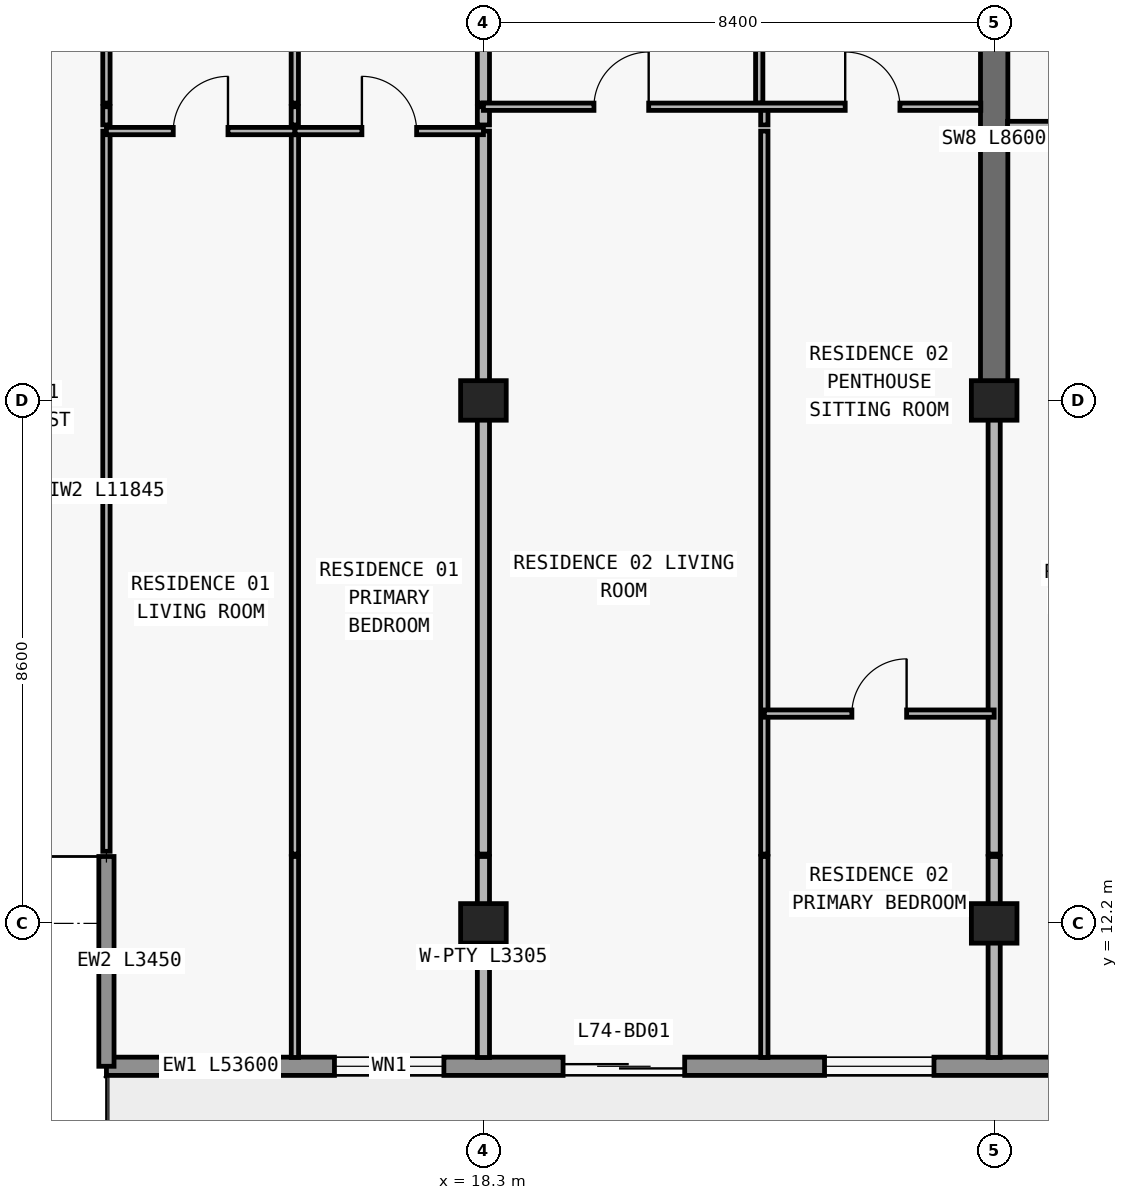
"""IFC4 building model, lengths in metres.
Left out: names, types, materials, properties, quantities, classifications, styles, units other than length and angle.
Written with IfcOpenShell. Run it as: python <this file> out.ifc"""

import sys

from ifc_helpers import new_model, si_unit, direction, frame, frame_2d, origin, origin_2d, place, context, subcontext, project, spatial, rectangle, extrude, element, fill, save


model = new_model("IFC4")
c1 = context("Model", 3, precision=1e-05, world=origin(), true_north=direction((0.0, 1.0)))
c2 = subcontext(c1, "Body", "Model", "MODEL_VIEW")
j1 = project(units=[si_unit("LENGTHUNIT", "METRE"), si_unit("PLANEANGLEUNIT", "RADIAN")], contexts=[c1])
p1 = place(None, origin())
s1 = spatial("IfcSite", under=j1, at=p1, CompositionType="ELEMENT")
p2 = place(p1, origin())
s2 = spatial("IfcBuilding", under=s1, at=p2, CompositionType="ELEMENT")
p3 = place(p2, frame((0.0, 0.0, 262.8)))
s3 = spatial("IfcBuildingStorey", under=s2, at=p3, CompositionType="ELEMENT", Elevation=262.8)
for number, where, z_axis, x_axis in (
    (1, (18.3, 12.2, 0.0), (0.0, 0.0, 1.0), (1.0, 0.0, 0.0)),
    (2, (26.7, 12.2, 0.0), (0.0, 0.0, 1.0), (1.0, 0.0, 0.0)),
    (3, (18.3, 20.8, 0.0), (0.0, 0.0, 1.0), (1.0, 0.0, 0.0)),
    (4, (26.7, 20.8, 0.0), (0.0, 0.0, 1.0), (1.0, 0.0, 0.0)),
):
    element("IfcColumn", number, at=place(p3, frame(where, z_axis=z_axis, x_axis=x_axis)), inside=s3, PredefinedType="COLUMN", context=c2, shape_type="SweptSolid", body=[
        extrude(rectangle(XDim=0.75, YDim=0.65, at=origin_2d()), origin(), (0.0, 0.0, 1.0), 3.05),
    ])
p4 = place(p3, frame((26.7, 20.8, 0.0), z_axis=(0.0, 0.0, 1.0), x_axis=(0.0, 1.0, 0.0)))
e5 = element("IfcWall", 5, at=p4, inside=s3, PredefinedType="SHEAR", context=c2, shape_type="SweptSolid", body=[
    extrude(rectangle(XDim=8.6, YDim=0.45, at=frame_2d((4.3, 0.0))), origin(), (0.0, 0.0, 1.0), 3.05),
])
p5 = place(p3, frame((65.7, 9.85, 0.0), z_axis=(0.0, 0.0, 1.0), x_axis=(-1.0, 0.0, 0.0)))
e6 = element("IfcWall", 6, at=p5, inside=s3, PredefinedType="STANDARD", context=c2, shape_type="SweptSolid", body=[
    extrude(rectangle(XDim=53.6, YDim=0.3, at=frame_2d((26.8, 0.0))), origin(), (0.0, 0.0, 1.0), 3.05),
])
p6 = place(p5, frame((48.05, 0.0, 0.85)))
e7 = element("IfcOpeningElement", 7, at=p6, cuts=e6, PredefinedType="OPENING", context=c2, shape_type="SweptSolid", body=[
    extrude(rectangle(XDim=1.8, YDim=1.55, at=frame_2d((0.9, 0.775))), frame((0.0, 0.16, 0.0), z_axis=(0.0, -1.0, 0.0), x_axis=(1.0, 0.0, 0.0)), (0.0, 0.0, 1.0), 0.32),
])
p7 = place(p5, frame((44.09, 0.0, 0.0)))
e8 = element("IfcOpeningElement", 8, at=p7, cuts=e6, PredefinedType="OPENING", context=c2, shape_type="SweptSolid", body=[
    extrude(rectangle(XDim=2.0, YDim=2.3, at=frame_2d((1.0, 1.15))), frame((0.0, 0.16, 0.0), z_axis=(0.0, -1.0, 0.0), x_axis=(1.0, 0.0, 0.0)), (0.0, 0.0, 1.0), 0.32),
])
p8 = place(p5, frame((39.99, 0.0, 0.85)))
e9 = element("IfcOpeningElement", 9, at=p8, cuts=e6, PredefinedType="OPENING", context=c2, shape_type="SweptSolid", body=[
    extrude(rectangle(XDim=1.8, YDim=1.55, at=frame_2d((0.9, 0.775))), frame((0.0, 0.16, 0.0), z_axis=(0.0, -1.0, 0.0), x_axis=(1.0, 0.0, 0.0)), (0.0, 0.0, 1.0), 0.32),
])
p9 = place(p5, frame((36.026, 0.0, 0.0)))
e10 = element("IfcOpeningElement", 10, at=p9, cuts=e6, PredefinedType="OPENING", context=c2, shape_type="SweptSolid", body=[
    extrude(rectangle(XDim=2.0, YDim=2.3, at=frame_2d((1.0, 1.15))), frame((0.0, 0.16, 0.0), z_axis=(0.0, -1.0, 0.0), x_axis=(1.0, 0.0, 0.0)), (0.0, 0.0, 1.0), 0.32),
])
p10 = place(p5, frame((31.726, 0.0, 0.85)))
e11 = element("IfcOpeningElement", 11, at=p10, cuts=e6, PredefinedType="OPENING", context=c2, shape_type="SweptSolid", body=[
    extrude(rectangle(XDim=2.2, YDim=1.55, at=frame_2d((1.1, 0.775))), frame((0.0, 0.16, 0.0), z_axis=(0.0, -1.0, 0.0), x_axis=(1.0, 0.0, 0.0)), (0.0, 0.0, 1.0), 0.32),
])
p11 = place(p5, frame((27.51, 0.0, 0.0)))
e12 = element("IfcOpeningElement", 12, at=p11, cuts=e6, PredefinedType="OPENING", context=c2, shape_type="SweptSolid", body=[
    extrude(rectangle(XDim=2.0, YDim=2.3, at=frame_2d((1.0, 1.15))), frame((0.0, 0.16, 0.0), z_axis=(0.0, -1.0, 0.0), x_axis=(1.0, 0.0, 0.0)), (0.0, 0.0, 1.0), 0.32),
])
p12 = place(p5, frame((23.81, 0.0, 0.85)))
e13 = element("IfcOpeningElement", 13, at=p12, cuts=e6, PredefinedType="OPENING", context=c2, shape_type="SweptSolid", body=[
    extrude(rectangle(XDim=1.8, YDim=1.55, at=frame_2d((0.9, 0.775))), frame((0.0, 0.16, 0.0), z_axis=(0.0, -1.0, 0.0), x_axis=(1.0, 0.0, 0.0)), (0.0, 0.0, 1.0), 0.32),
])
p13 = place(p5, frame((20.026, 0.0, 0.0)))
e14 = element("IfcOpeningElement", 14, at=p13, cuts=e6, PredefinedType="OPENING", context=c2, shape_type="SweptSolid", body=[
    extrude(rectangle(XDim=2.0, YDim=2.3, at=frame_2d((1.0, 1.15))), frame((0.0, 0.16, 0.0), z_axis=(0.0, -1.0, 0.0), x_axis=(1.0, 0.0, 0.0)), (0.0, 0.0, 1.0), 0.32),
])
p14 = place(p5, frame((15.726, 0.0, 0.85)))
e15 = element("IfcOpeningElement", 15, at=p14, cuts=e6, PredefinedType="OPENING", context=c2, shape_type="SweptSolid", body=[
    extrude(rectangle(XDim=2.2, YDim=1.55, at=frame_2d((1.1, 0.775))), frame((0.0, 0.16, 0.0), z_axis=(0.0, -1.0, 0.0), x_axis=(1.0, 0.0, 0.0)), (0.0, 0.0, 1.0), 0.32),
])
p15 = place(p5, frame((11.69, 0.0, 0.0)))
e16 = element("IfcOpeningElement", 16, at=p15, cuts=e6, PredefinedType="OPENING", context=c2, shape_type="SweptSolid", body=[
    extrude(rectangle(XDim=2.0, YDim=2.3, at=frame_2d((1.0, 1.15))), frame((0.0, 0.16, 0.0), z_axis=(0.0, -1.0, 0.0), x_axis=(1.0, 0.0, 0.0)), (0.0, 0.0, 1.0), 0.32),
])
p16 = place(p5, frame((7.01, 0.0, 0.65)))
e17 = element("IfcOpeningElement", 17, at=p16, cuts=e6, PredefinedType="OPENING", context=c2, shape_type="SweptSolid", body=[
    extrude(rectangle(XDim=2.6, YDim=1.85, at=frame_2d((1.3, 0.925))), frame((0.0, 0.16, 0.0), z_axis=(0.0, -1.0, 0.0), x_axis=(1.0, 0.0, 0.0)), (0.0, 0.0, 1.0), 0.32),
])
p17 = place(p5, frame((2.0, 0.0, 0.85)))
e18 = element("IfcOpeningElement", 18, at=p17, cuts=e6, PredefinedType="OPENING", context=c2, shape_type="SweptSolid", body=[
    extrude(rectangle(XDim=2.2, YDim=1.55, at=frame_2d((1.1, 0.775))), frame((0.0, 0.16, 0.0), z_axis=(0.0, -1.0, 0.0), x_axis=(1.0, 0.0, 0.0)), (0.0, 0.0, 1.0), 0.32),
])
p18 = place(p3, frame((12.1, 13.3, 0.0), z_axis=(0.0, 0.0, 1.0), x_axis=(0.0, -1.0, 0.0)))
e19 = element("IfcWall", 19, at=p18, inside=s3, PredefinedType="ELEMENTEDWALL", context=c2, shape_type="SweptSolid", body=[
    extrude(rectangle(XDim=3.45, YDim=0.25, at=frame_2d((1.725, 0.0))), origin(), (0.0, 0.0, 1.0), 3.05),
])
p19 = place(p3, frame((12.1, 13.385, 0.0), z_axis=(0.0, 0.0, 1.0), x_axis=(0.0, 1.0, 0.0)))
e20 = element("IfcWall", 20, at=p19, inside=s3, PredefinedType="PARTITIONING", context=c2, shape_type="SweptSolid", body=[
    extrude(rectangle(XDim=11.845, YDim=0.12, at=frame_2d((5.922, 0.0))), origin(), (0.0, 0.0, 1.0), 2.578),
])
p20 = place(p3, frame((12.1, 25.33, 0.0), z_axis=(0.0, 0.0, 1.0), x_axis=(0.0, 1.0, 0.0)))
e21 = element("IfcWall", 21, at=p20, inside=s3, PredefinedType="PARTITIONING", context=c2, shape_type="SweptSolid", body=[
    extrude(rectangle(XDim=0.3, YDim=0.12, at=frame_2d((0.15, 0.0))), origin(), (0.0, 0.0, 1.0), 2.578),
])
p21 = place(p3, frame((12.1, 25.69, 0.0), z_axis=(0.0, 0.0, 1.0), x_axis=(0.0, 1.0, 0.0)))
e22 = element("IfcWall", 22, at=p21, inside=s3, PredefinedType="PARTITIONING", context=c2, shape_type="SweptSolid", body=[
    extrude(rectangle(XDim=4.69, YDim=0.12, at=frame_2d((2.345, 0.0))), origin(), (0.0, 0.0, 1.0), 2.578),
])
p22 = place(p21, frame((1.895, 0.0, 0.0)))
e23 = element("IfcOpeningElement", 23, at=p22, cuts=e22, PredefinedType="OPENING", context=c2, shape_type="SweptSolid", body=[
    extrude(rectangle(XDim=0.9, YDim=2.15, at=frame_2d((0.45, 1.075))), frame((0.0, 0.07, 0.0), z_axis=(0.0, -1.0, 0.0), x_axis=(1.0, 0.0, 0.0)), (0.0, 0.0, 1.0), 0.14),
])
p23 = place(p3, frame((15.198, 25.33, 0.0), z_axis=(0.0, 0.0, 1.0), x_axis=(0.0, 1.0, 0.0)))
e24 = element("IfcWall", 24, at=p23, inside=s3, PredefinedType="PARTITIONING", context=c2, shape_type="SweptSolid", body=[
    extrude(rectangle(XDim=0.3, YDim=0.12, at=frame_2d((0.15, 0.0))), origin(), (0.0, 0.0, 1.0), 3.05),
])
p24 = place(p3, frame((15.198, 25.69, 0.0), z_axis=(0.0, 0.0, 1.0), x_axis=(0.0, 1.0, 0.0)))
e25 = element("IfcWall", 25, at=p24, inside=s3, PredefinedType="PARTITIONING", context=c2, shape_type="SweptSolid", body=[
    extrude(rectangle(XDim=4.69, YDim=0.12, at=frame_2d((2.345, 0.0))), origin(), (0.0, 0.0, 1.0), 3.05),
])
p25 = place(p24, frame((1.895, 0.0, 0.0)))
e26 = element("IfcOpeningElement", 26, at=p25, cuts=e25, PredefinedType="OPENING", context=c2, shape_type="SweptSolid", body=[
    extrude(rectangle(XDim=0.9, YDim=2.15, at=frame_2d((0.45, 1.075))), frame((0.0, 0.07, 0.0), z_axis=(0.0, -1.0, 0.0), x_axis=(1.0, 0.0, 0.0)), (0.0, 0.0, 1.0), 0.14),
])
p26 = place(p3, frame((15.2, 9.995, 0.0), z_axis=(0.0, 0.0, 1.0), x_axis=(0.0, 1.0, 0.0)))
e27 = element("IfcWall", 27, at=p26, inside=s3, PredefinedType="PARTITIONING", context=c2, shape_type="SweptSolid", body=[
    extrude(rectangle(XDim=3.305, YDim=0.12, at=frame_2d((1.652, 0.0))), origin(), (0.0, 0.0, 1.0), 3.05),
])
p27 = place(p3, frame((15.2, 13.34, 0.0), z_axis=(0.0, 0.0, 1.0), x_axis=(0.0, 1.0, 0.0)))
e28 = element("IfcWall", 28, at=p27, inside=s3, PredefinedType="PARTITIONING", context=c2, shape_type="SweptSolid", body=[
    extrude(rectangle(XDim=11.89, YDim=0.12, at=frame_2d((5.945, 0.0))), origin(), (0.0, 0.0, 1.0), 3.05),
])
p28 = place(p3, frame((18.3, 9.995, 0.0), z_axis=(0.0, 0.0, 1.0), x_axis=(0.0, 1.0, 0.0)))
e29 = element("IfcWall", 29, at=p28, inside=s3, PredefinedType="PARTITIONING", context=c2, shape_type="SweptSolid", body=[
    extrude(rectangle(XDim=3.305, YDim=0.2, at=frame_2d((1.652, 0.0))), origin(), (0.0, 0.0, 1.0), 2.263),
])
p29 = place(p3, frame((18.3, 13.34, 0.0), z_axis=(0.0, 0.0, 1.0), x_axis=(0.0, 1.0, 0.0)))
e30 = element("IfcWall", 30, at=p29, inside=s3, PredefinedType="PARTITIONING", context=c2, shape_type="SweptSolid", body=[
    extrude(rectangle(XDim=11.89, YDim=0.2, at=frame_2d((5.945, 0.0))), origin(), (0.0, 0.0, 1.0), 2.263),
])
p30 = place(p3, frame((18.3, 25.33, 0.0), z_axis=(0.0, 0.0, 1.0), x_axis=(0.0, 1.0, 0.0)))
e31 = element("IfcWall", 31, at=p30, inside=s3, PredefinedType="PARTITIONING", context=c2, shape_type="SweptSolid", body=[
    extrude(rectangle(XDim=0.3, YDim=0.2, at=frame_2d((0.15, 0.0))), origin(), (0.0, 0.0, 1.0), 2.263),
])
p31 = place(p3, frame((18.3, 25.69, 0.0), z_axis=(0.0, 0.0, 1.0), x_axis=(0.0, 1.0, 0.0)))
e32 = element("IfcWall", 32, at=p31, inside=s3, PredefinedType="PARTITIONING", context=c2, shape_type="SweptSolid", body=[
    extrude(rectangle(XDim=4.69, YDim=0.2, at=frame_2d((2.345, 0.0))), origin(), (0.0, 0.0, 1.0), 2.263),
])
p32 = place(p3, frame((22.836, 25.69, 0.0), z_axis=(0.0, 0.0, 1.0), x_axis=(0.0, 1.0, 0.0)))
e33 = element("IfcWall", 33, at=p32, inside=s3, PredefinedType="PARTITIONING", context=c2, shape_type="SweptSolid", body=[
    extrude(rectangle(XDim=4.69, YDim=0.12, at=frame_2d((2.345, 0.0))), origin(), (0.0, 0.0, 1.0), 3.05),
])
p33 = place(p32, frame((1.895, 0.0, 0.0)))
e34 = element("IfcOpeningElement", 34, at=p33, cuts=e33, PredefinedType="OPENING", context=c2, shape_type="SweptSolid", body=[
    extrude(rectangle(XDim=0.9, YDim=2.15, at=frame_2d((0.45, 1.075))), frame((0.0, 0.07, 0.0), z_axis=(0.0, -1.0, 0.0), x_axis=(1.0, 0.0, 0.0)), (0.0, 0.0, 1.0), 0.14),
])
p34 = place(p3, frame((22.92, 9.995, 0.0), z_axis=(0.0, 0.0, 1.0), x_axis=(0.0, 1.0, 0.0)))
e35 = element("IfcWall", 35, at=p34, inside=s3, PredefinedType="PARTITIONING", context=c2, shape_type="SweptSolid", body=[
    extrude(rectangle(XDim=3.305, YDim=0.12, at=frame_2d((1.652, 0.0))), origin(), (0.0, 0.0, 1.0), 3.05),
])
p35 = place(p3, frame((22.92, 13.34, 0.0), z_axis=(0.0, 0.0, 1.0), x_axis=(0.0, 1.0, 0.0)))
e36 = element("IfcWall", 36, at=p35, inside=s3, PredefinedType="PARTITIONING", context=c2, shape_type="SweptSolid", body=[
    extrude(rectangle(XDim=11.89, YDim=0.12, at=frame_2d((5.945, 0.0))), origin(), (0.0, 0.0, 1.0), 3.05),
])
p36 = place(p3, frame((22.92, 25.33, 0.0), z_axis=(0.0, 0.0, 1.0), x_axis=(0.0, 1.0, 0.0)))
e37 = element("IfcWall", 37, at=p36, inside=s3, PredefinedType="PARTITIONING", context=c2, shape_type="SweptSolid", body=[
    extrude(rectangle(XDim=0.3, YDim=0.12, at=frame_2d((0.15, 0.0))), origin(), (0.0, 0.0, 1.0), 3.05),
])
p37 = place(p3, frame((26.7, 9.995, 0.0), z_axis=(0.0, 0.0, 1.0), x_axis=(0.0, 1.0, 0.0)))
e38 = element("IfcWall", 38, at=p37, inside=s3, PredefinedType="PARTITIONING", context=c2, shape_type="SweptSolid", body=[
    extrude(rectangle(XDim=3.305, YDim=0.2, at=frame_2d((1.652, 0.0))), origin(), (0.0, 0.0, 1.0), 2.263),
])
p38 = place(p3, frame((26.7, 13.34, 0.0), z_axis=(0.0, 0.0, 1.0), x_axis=(0.0, 1.0, 0.0)))
e39 = element("IfcWall", 39, at=p38, inside=s3, PredefinedType="PARTITIONING", context=c2, shape_type="SweptSolid", body=[
    extrude(rectangle(XDim=7.455, YDim=0.2, at=frame_2d((3.728, 0.0))), origin(), (0.0, 0.0, 1.0), 2.263),
])
p39 = place(p3, frame((22.92, 15.65, 0.0), z_axis=(0.0, 0.0, 1.0), x_axis=(1.0, 0.0, 0.0)))
e40 = element("IfcWall", 40, at=p39, inside=s3, PredefinedType="PARTITIONING", context=c2, shape_type="SweptSolid", body=[
    extrude(rectangle(XDim=3.78, YDim=0.12, at=frame_2d((1.89, 0.0))), origin(), (0.0, 0.0, 1.0), 3.05),
])
p40 = place(p39, frame((1.44, 0.0, 0.0)))
e41 = element("IfcOpeningElement", 41, at=p40, cuts=e40, PredefinedType="OPENING", context=c2, shape_type="SweptSolid", body=[
    extrude(rectangle(XDim=0.9, YDim=2.15, at=frame_2d((0.45, 1.075))), frame((0.0, 0.07, 0.0), z_axis=(0.0, -1.0, 0.0), x_axis=(1.0, 0.0, 0.0)), (0.0, 0.0, 1.0), 0.14),
])
p41 = place(p3, frame((12.1, 25.23, 0.0), z_axis=(0.0, 0.0, 1.0), x_axis=(1.0, 0.0, 0.0)))
e42 = element("IfcWall", 42, at=p41, inside=s3, PredefinedType="PARTITIONING", context=c2, shape_type="SweptSolid", body=[
    extrude(rectangle(XDim=3.098, YDim=0.12, at=frame_2d((1.549, 0.0))), origin(), (0.0, 0.0, 1.0), 3.05),
])
p42 = place(p41, frame((1.099, 0.0, 0.0)))
e43 = element("IfcOpeningElement", 43, at=p42, cuts=e42, PredefinedType="OPENING", context=c2, shape_type="SweptSolid", body=[
    extrude(rectangle(XDim=0.9, YDim=2.15, at=frame_2d((0.45, 1.075))), frame((0.0, 0.07, 0.0), z_axis=(0.0, -1.0, 0.0), x_axis=(1.0, 0.0, 0.0)), (0.0, 0.0, 1.0), 0.14),
])
p43 = place(p3, frame((15.203, 25.23, 0.0), z_axis=(0.0, 0.0, 1.0), x_axis=(1.0, 0.0, 0.0)))
e44 = element("IfcWall", 44, at=p43, inside=s3, PredefinedType="PARTITIONING", context=c2, shape_type="SweptSolid", body=[
    extrude(rectangle(XDim=3.097, YDim=0.12, at=frame_2d((1.549, 0.0))), origin(), (0.0, 0.0, 1.0), 3.05),
])
p44 = place(p43, frame((1.098, 0.0, 0.0)))
e45 = element("IfcOpeningElement", 45, at=p44, cuts=e44, PredefinedType="OPENING", context=c2, shape_type="SweptSolid", body=[
    extrude(rectangle(XDim=0.9, YDim=2.15, at=frame_2d((0.45, 1.075))), frame((0.0, 0.07, 0.0), z_axis=(0.0, -1.0, 0.0), x_axis=(1.0, 0.0, 0.0)), (0.0, 0.0, 1.0), 0.14),
])
p45 = place(p3, frame((26.92, 25.33, 0.0), z_axis=(0.0, 0.0, 1.0), x_axis=(1.0, 0.0, 0.0)))
e46 = element("IfcWall", 46, at=p45, inside=s3, PredefinedType="PARTITIONING", context=c2, shape_type="SweptSolid", body=[
    extrude(rectangle(XDim=4.566, YDim=0.12, at=frame_2d((2.283, 0.0))), origin(), (0.0, 0.0, 1.0), 3.05),
])
p46 = place(p45, frame((1.414, 0.0, 0.0)))
e47 = element("IfcOpeningElement", 47, at=p46, cuts=e46, PredefinedType="OPENING", context=c2, shape_type="SweptSolid", body=[
    extrude(rectangle(XDim=0.9, YDim=2.15, at=frame_2d((0.45, 1.075))), frame((0.0, 0.07, 0.0), z_axis=(0.0, -1.0, 0.0), x_axis=(1.0, 0.0, 0.0)), (0.0, 0.0, 1.0), 0.14),
])
p47 = place(p3, frame((18.3, 25.63, 0.0), z_axis=(0.0, 0.0, 1.0), x_axis=(1.0, 0.0, 0.0)))
e48 = element("IfcWall", 48, at=p47, inside=s3, PredefinedType="PARTITIONING", context=c2, shape_type="SweptSolid", body=[
    extrude(rectangle(XDim=8.18, YDim=0.12, at=frame_2d((4.09, 0.0))), origin(), (0.0, 0.0, 1.0), 3.05),
])
p48 = place(p47, frame((1.818, 0.0, 0.0)))
e49 = element("IfcOpeningElement", 49, at=p48, cuts=e48, PredefinedType="OPENING", context=c2, shape_type="SweptSolid", body=[
    extrude(rectangle(XDim=0.9, YDim=2.15, at=frame_2d((0.45, 1.075))), frame((0.0, 0.07, 0.0), z_axis=(0.0, -1.0, 0.0), x_axis=(1.0, 0.0, 0.0)), (0.0, 0.0, 1.0), 0.14),
])
p49 = place(p47, frame((5.95, 0.0, 0.0)))
e50 = element("IfcOpeningElement", 50, at=p49, cuts=e48, PredefinedType="OPENING", context=c2, shape_type="SweptSolid", body=[
    extrude(rectangle(XDim=0.9, YDim=2.15, at=frame_2d((0.45, 1.075))), frame((0.0, 0.07, 0.0), z_axis=(0.0, -1.0, 0.0), x_axis=(1.0, 0.0, 0.0)), (0.0, 0.0, 1.0), 0.14),
])
p50 = place(p6, origin())
e51 = element("IfcWindow", 51, at=p50, inside=s3, PartitioningType="SINGLE_PANEL", PredefinedType="WINDOW", context=c2, shape_type="SweptSolid", body=[
    extrude(rectangle(XDim=1.8, YDim=1.55, at=frame_2d((0.9, 0.775))), frame((0.0, 0.03, 0.0), z_axis=(0.0, -1.0, 0.0), x_axis=(1.0, 0.0, 0.0)), (0.0, 0.0, 1.0), 0.06),
])
fill(e7, e51)
p51 = place(p7, origin())
e52 = element("IfcDoor", 52, at=p51, inside=s3, OperationType="DOUBLE_DOOR_SLIDING", PredefinedType="DOOR", context=c2, shape_type="SweptSolid", body=[
    extrude(rectangle(XDim=2.0, YDim=2.3, at=frame_2d((1.0, 1.15))), frame((0.0, 0.025, 0.0), z_axis=(0.0, -1.0, 0.0), x_axis=(1.0, 0.0, 0.0)), (0.0, 0.0, 1.0), 0.05),
])
fill(e8, e52)
p52 = place(p8, origin())
e53 = element("IfcWindow", 53, at=p52, inside=s3, PartitioningType="SINGLE_PANEL", PredefinedType="WINDOW", context=c2, shape_type="SweptSolid", body=[
    extrude(rectangle(XDim=1.8, YDim=1.55, at=frame_2d((0.9, 0.775))), frame((0.0, 0.03, 0.0), z_axis=(0.0, -1.0, 0.0), x_axis=(1.0, 0.0, 0.0)), (0.0, 0.0, 1.0), 0.06),
])
fill(e9, e53)
p53 = place(p42, origin())
e54 = element("IfcDoor", 54, at=p53, inside=s3, OperationType="SINGLE_SWING_RIGHT", PredefinedType="DOOR", context=c2, shape_type="SweptSolid", body=[
    extrude(rectangle(XDim=0.9, YDim=2.15, at=frame_2d((0.45, 1.075))), frame((0.0, 0.025, 0.0), z_axis=(0.0, -1.0, 0.0), x_axis=(1.0, 0.0, 0.0)), (0.0, 0.0, 1.0), 0.05),
])
fill(e43, e54)
p54 = place(p44, origin())
e55 = element("IfcDoor", 55, at=p54, inside=s3, OperationType="SINGLE_SWING_LEFT", PredefinedType="DOOR", context=c2, shape_type="SweptSolid", body=[
    extrude(rectangle(XDim=0.9, YDim=2.15, at=frame_2d((0.45, 1.075))), frame((0.0, 0.025, 0.0), z_axis=(0.0, -1.0, 0.0), x_axis=(1.0, 0.0, 0.0)), (0.0, 0.0, 1.0), 0.05),
])
fill(e45, e55)
p55 = place(p48, origin())
e56 = element("IfcDoor", 56, at=p55, inside=s3, OperationType="SINGLE_SWING_RIGHT", PredefinedType="DOOR", context=c2, shape_type="SweptSolid", body=[
    extrude(rectangle(XDim=0.9, YDim=2.15, at=frame_2d((0.45, 1.075))), frame((0.0, 0.025, 0.0), z_axis=(0.0, -1.0, 0.0), x_axis=(1.0, 0.0, 0.0)), (0.0, 0.0, 1.0), 0.05),
])
fill(e49, e56)
p56 = place(p49, origin())
e57 = element("IfcDoor", 57, at=p56, inside=s3, OperationType="SINGLE_SWING_LEFT", PredefinedType="DOOR", context=c2, shape_type="SweptSolid", body=[
    extrude(rectangle(XDim=0.9, YDim=2.15, at=frame_2d((0.45, 1.075))), frame((0.0, 0.025, 0.0), z_axis=(0.0, -1.0, 0.0), x_axis=(1.0, 0.0, 0.0)), (0.0, 0.0, 1.0), 0.05),
])
fill(e50, e57)
p57 = place(p40, origin())
e58 = element("IfcDoor", 58, at=p57, inside=s3, OperationType="SINGLE_SWING_RIGHT", PredefinedType="DOOR", context=c2, shape_type="SweptSolid", body=[
    extrude(rectangle(XDim=0.9, YDim=2.15, at=frame_2d((0.45, 1.075))), frame((0.0, 0.025, 0.0), z_axis=(0.0, -1.0, 0.0), x_axis=(1.0, 0.0, 0.0)), (0.0, 0.0, 1.0), 0.05),
])
fill(e41, e58)
save(model, sys.argv[1])
